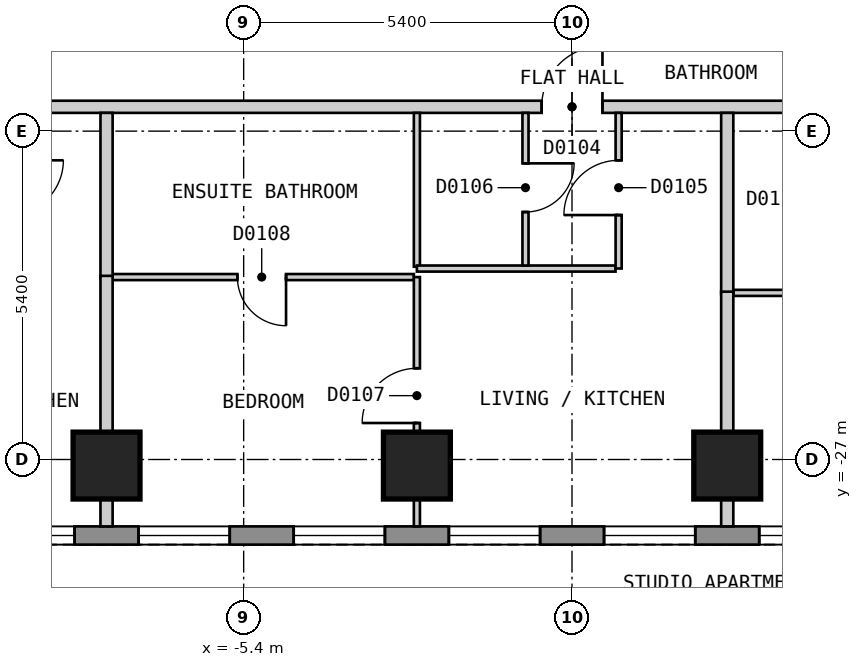
"""IFC4 building model, lengths in metres.
Left out: names, types, materials, properties, quantities, classifications, styles, units other than length and angle.
Written with IfcOpenShell. Run it as: python <this file> out.ifc"""

import sys

from ifc_helpers import new_model, si_unit, direction, frame, frame_2d, origin, origin_2d, place, context, subcontext, project, spatial, polyline, rectangle, outline, extrude, element, fill, save


model = new_model("IFC4")
c1 = context("Model", 3, precision=1e-05, world=origin(), true_north=direction((0.0, 1.0)))
c2 = subcontext(c1, "Body", "Model", "MODEL_VIEW")
j1 = project(units=[si_unit("LENGTHUNIT", "METRE"), si_unit("PLANEANGLEUNIT", "RADIAN")], contexts=[c1])
p1 = place(None, origin())
s1 = spatial("IfcSite", under=j1, at=p1, CompositionType="ELEMENT")
p2 = place(p1, origin())
s2 = spatial("IfcBuilding", under=s1, at=p2, CompositionType="ELEMENT")
p3 = place(p2, frame((0.0, 0.0, 23.4)))
s3 = spatial("IfcBuildingStorey", under=s2, at=p3, CompositionType="ELEMENT", Elevation=23.4)
for number, where, z_axis, x_axis in (
    (1, (-7.655, -27.1, 0.0), (0.0, 0.0, 1.0), (1.0, 0.0, 0.0)),
    (2, (-2.551, -27.1, 0.0), (0.0, 0.0, 1.0), (1.0, 0.0, 0.0)),
    (3, (2.553, -27.1, 0.0), (0.0, 0.0, 1.0), (1.0, 0.0, 0.0)),
):
    element("IfcColumn", number, at=place(p3, frame(where, z_axis=z_axis, x_axis=x_axis)), inside=s3, PredefinedType="COLUMN", context=c2, shape_type="SweptSolid", body=[
        extrude(rectangle(XDim=1.1, YDim=1.1, at=origin_2d()), origin(), (0.0, 0.0, 1.0), 3.0),
    ])
p4 = place(p3, frame((-13.51, -28.25, 0.0), z_axis=(0.0, 0.0, 1.0), x_axis=(1.0, 0.0, 0.0)))
e4 = element("IfcWall", 4, at=p4, inside=s3, PredefinedType="SOLIDWALL", context=c2, shape_type="SweptSolid", body=[
    extrude(outline(polyline([(0.0, -0.15), (27.02, -0.15), (26.94, 0.15), (0.08, 0.15), (0.0, -0.15)])), origin(), (0.0, 0.0, 1.0), 2.7),
])
p5 = place(p4, frame((1.277, 0.0, 0.15)))
e5 = element("IfcOpeningElement", 5, at=p5, cuts=e4, PredefinedType="OPENING", context=c2, shape_type="SweptSolid", body=[
    extrude(rectangle(XDim=1.5, YDim=2.1, at=frame_2d((0.75, 1.05))), frame((0.0, 0.16, 0.0), z_axis=(0.0, -1.0, 0.0), x_axis=(1.0, 0.0, 0.0)), (0.0, 0.0, 1.0), 0.32),
])
p6 = place(p4, frame((3.829, 0.0, 0.15)))
e6 = element("IfcOpeningElement", 6, at=p6, cuts=e4, PredefinedType="OPENING", context=c2, shape_type="SweptSolid", body=[
    extrude(rectangle(XDim=1.5, YDim=2.1, at=frame_2d((0.75, 1.05))), frame((0.0, 0.16, 0.0), z_axis=(0.0, -1.0, 0.0), x_axis=(1.0, 0.0, 0.0)), (0.0, 0.0, 1.0), 0.32),
])
p7 = place(p4, frame((6.381, 0.0, 0.15)))
e7 = element("IfcOpeningElement", 7, at=p7, cuts=e4, PredefinedType="OPENING", context=c2, shape_type="SweptSolid", body=[
    extrude(rectangle(XDim=1.5, YDim=2.1, at=frame_2d((0.75, 1.05))), frame((0.0, 0.16, 0.0), z_axis=(0.0, -1.0, 0.0), x_axis=(1.0, 0.0, 0.0)), (0.0, 0.0, 1.0), 0.32),
])
p8 = place(p4, frame((8.933, 0.0, 0.15)))
e8 = element("IfcOpeningElement", 8, at=p8, cuts=e4, PredefinedType="OPENING", context=c2, shape_type="SweptSolid", body=[
    extrude(rectangle(XDim=1.5, YDim=2.1, at=frame_2d((0.75, 1.05))), frame((0.0, 0.16, 0.0), z_axis=(0.0, -1.0, 0.0), x_axis=(1.0, 0.0, 0.0)), (0.0, 0.0, 1.0), 0.32),
])
p9 = place(p4, frame((11.485, 0.0, 0.15)))
e9 = element("IfcOpeningElement", 9, at=p9, cuts=e4, PredefinedType="OPENING", context=c2, shape_type="SweptSolid", body=[
    extrude(rectangle(XDim=1.5, YDim=2.1, at=frame_2d((0.75, 1.05))), frame((0.0, 0.16, 0.0), z_axis=(0.0, -1.0, 0.0), x_axis=(1.0, 0.0, 0.0)), (0.0, 0.0, 1.0), 0.32),
])
p10 = place(p4, frame((14.037, 0.0, 0.15)))
e10 = element("IfcOpeningElement", 10, at=p10, cuts=e4, PredefinedType="OPENING", context=c2, shape_type="SweptSolid", body=[
    extrude(rectangle(XDim=1.5, YDim=2.1, at=frame_2d((0.75, 1.05))), frame((0.0, 0.16, 0.0), z_axis=(0.0, -1.0, 0.0), x_axis=(1.0, 0.0, 0.0)), (0.0, 0.0, 1.0), 0.32),
])
p11 = place(p4, frame((16.589, 0.0, 0.15)))
e11 = element("IfcOpeningElement", 11, at=p11, cuts=e4, PredefinedType="OPENING", context=c2, shape_type="SweptSolid", body=[
    extrude(rectangle(XDim=1.5, YDim=2.1, at=frame_2d((0.75, 1.05))), frame((0.0, 0.16, 0.0), z_axis=(0.0, -1.0, 0.0), x_axis=(1.0, 0.0, 0.0)), (0.0, 0.0, 1.0), 0.32),
])
p12 = place(p4, frame((19.141, 0.0, 0.15)))
e12 = element("IfcOpeningElement", 12, at=p12, cuts=e4, PredefinedType="OPENING", context=c2, shape_type="SweptSolid", body=[
    extrude(rectangle(XDim=1.5, YDim=2.1, at=frame_2d((0.75, 1.05))), frame((0.0, 0.16, 0.0), z_axis=(0.0, -1.0, 0.0), x_axis=(1.0, 0.0, 0.0)), (0.0, 0.0, 1.0), 0.32),
])
p13 = place(p4, frame((21.693, 0.0, 0.15)))
e13 = element("IfcOpeningElement", 13, at=p13, cuts=e4, PredefinedType="OPENING", context=c2, shape_type="SweptSolid", body=[
    extrude(rectangle(XDim=1.5, YDim=2.1, at=frame_2d((0.75, 1.05))), frame((0.0, 0.16, 0.0), z_axis=(0.0, -1.0, 0.0), x_axis=(1.0, 0.0, 0.0)), (0.0, 0.0, 1.0), 0.32),
])
p14 = place(p4, frame((24.245, 0.0, 0.15)))
e14 = element("IfcOpeningElement", 14, at=p14, cuts=e4, PredefinedType="OPENING", context=c2, shape_type="SweptSolid", body=[
    extrude(rectangle(XDim=1.5, YDim=2.1, at=frame_2d((0.75, 1.05))), frame((0.0, 0.16, 0.0), z_axis=(0.0, -1.0, 0.0), x_axis=(1.0, 0.0, 0.0)), (0.0, 0.0, 1.0), 0.32),
])
p15 = place(p3, frame((-15.4, -21.2, 0.0), z_axis=(0.0, 0.0, 1.0), x_axis=(1.0, 0.0, 0.0)))
e15 = element("IfcWall", 15, at=p15, inside=s3, PredefinedType="PARTITIONING", context=c2, shape_type="SweptSolid", body=[
    extrude(rectangle(XDim=30.799, YDim=0.2, at=frame_2d((15.399, 0.0))), origin(), (0.0, 0.0, 1.0), 2.7),
])
p16 = place(p15, frame((4.985, 0.0, 0.0)))
e16 = element("IfcOpeningElement", 16, at=p16, cuts=e15, PredefinedType="OPENING", context=c2, shape_type="SweptSolid", body=[
    extrude(rectangle(XDim=0.9, YDim=2.1, at=frame_2d((0.45, 1.05))), frame((0.0, 0.11, 0.0), z_axis=(0.0, -1.0, 0.0), x_axis=(1.0, 0.0, 0.0)), (0.0, 0.0, 1.0), 0.22),
])
p17 = place(p15, frame((14.901, 0.0, 0.0)))
e17 = element("IfcOpeningElement", 17, at=p17, cuts=e15, PredefinedType="OPENING", context=c2, shape_type="SweptSolid", body=[
    extrude(rectangle(XDim=1.0, YDim=2.1, at=frame_2d((0.5, 1.05))), frame((0.0, 0.11, 0.0), z_axis=(0.0, -1.0, 0.0), x_axis=(1.0, 0.0, 0.0)), (0.0, 0.0, 1.0), 0.22),
])
p18 = place(p15, frame((20.005, 0.0, 0.0)))
e18 = element("IfcOpeningElement", 18, at=p18, cuts=e15, PredefinedType="OPENING", context=c2, shape_type="SweptSolid", body=[
    extrude(rectangle(XDim=1.0, YDim=2.1, at=frame_2d((0.5, 1.05))), frame((0.0, 0.11, 0.0), z_axis=(0.0, -1.0, 0.0), x_axis=(1.0, 0.0, 0.0)), (0.0, 0.0, 1.0), 0.22),
])
p19 = place(p15, frame((24.916, 0.0, 0.0)))
e19 = element("IfcOpeningElement", 19, at=p19, cuts=e15, PredefinedType="OPENING", context=c2, shape_type="SweptSolid", body=[
    extrude(rectangle(XDim=0.9, YDim=2.1, at=frame_2d((0.45, 1.05))), frame((0.0, 0.11, 0.0), z_axis=(0.0, -1.0, 0.0), x_axis=(1.0, 0.0, 0.0)), (0.0, 0.0, 1.0), 0.22),
])
p20 = place(p3, frame((-2.551, -21.3, 0.0), z_axis=(0.0, 0.0, 1.0), x_axis=(0.0, -1.0, 0.0)))
e20 = element("IfcWall", 20, at=p20, inside=s3, PredefinedType="PARTITIONING", context=c2, shape_type="SweptSolid", body=[
    extrude(rectangle(XDim=2.53, YDim=0.1, at=frame_2d((1.265, 0.0))), origin(), (0.0, 0.0, 1.0), 2.7),
])
p21 = place(p3, frame((-2.551, -23.86, 0.0), z_axis=(0.0, 0.0, 1.0), x_axis=(1.0, 0.0, 0.0)))
e21 = element("IfcWall", 21, at=p21, inside=s3, PredefinedType="PARTITIONING", context=c2, shape_type="SweptSolid", body=[
    extrude(rectangle(XDim=3.267, YDim=0.1, at=frame_2d((1.634, 0.0))), origin(), (0.0, 0.0, 1.0), 2.7),
])
p22 = place(p3, frame((-7.555, -24.0, 0.0), z_axis=(0.0, 0.0, 1.0), x_axis=(1.0, 0.0, 0.0)))
e22 = element("IfcWall", 22, at=p22, inside=s3, PredefinedType="PARTITIONING", context=c2, shape_type="SweptSolid", body=[
    extrude(rectangle(XDim=4.954, YDim=0.1, at=frame_2d((2.477, 0.0))), origin(), (0.0, 0.0, 1.0), 2.7),
])
p23 = place(p22, frame((2.052, 0.0, 0.0)))
e23 = element("IfcOpeningElement", 23, at=p23, cuts=e22, PredefinedType="OPENING", context=c2, shape_type="SweptSolid", body=[
    extrude(rectangle(XDim=0.8, YDim=2.1, at=frame_2d((0.4, 1.05))), frame((0.0, 0.06, 0.0), z_axis=(0.0, -1.0, 0.0), x_axis=(1.0, 0.0, 0.0)), (0.0, 0.0, 1.0), 0.12),
])
p24 = place(p3, frame((2.653, -24.26, 0.0), z_axis=(0.0, 0.0, 1.0), x_axis=(1.0, 0.0, 0.0)))
e24 = element("IfcWall", 24, at=p24, inside=s3, PredefinedType="PARTITIONING", context=c2, shape_type="SweptSolid", body=[
    extrude(rectangle(XDim=3.167, YDim=0.1, at=frame_2d((1.583, 0.0))), origin(), (0.0, 0.0, 1.0), 2.7),
])
p25 = place(p3, frame((0.767, -23.859, 0.0), z_axis=(0.0, 0.0, 1.0), x_axis=(0.0, 1.0, 0.0)))
e25 = element("IfcWall", 25, at=p25, inside=s3, PredefinedType="PARTITIONING", context=c2, shape_type="SweptSolid", body=[
    extrude(rectangle(XDim=2.559, YDim=0.1, at=frame_2d((1.279, 0.0))), origin(), (0.0, 0.0, 1.0), 2.7),
])
p26 = place(p25, frame((0.879, 0.0, 0.0)))
e26 = element("IfcOpeningElement", 26, at=p26, cuts=e25, PredefinedType="OPENING", context=c2, shape_type="SweptSolid", body=[
    extrude(rectangle(XDim=0.9, YDim=2.1, at=frame_2d((0.45, 1.05))), frame((0.0, 0.06, 0.0), z_axis=(0.0, -1.0, 0.0), x_axis=(1.0, 0.0, 0.0)), (0.0, 0.0, 1.0), 0.12),
])
p27 = place(p3, frame((-0.765, -23.81, 0.0), z_axis=(0.0, 0.0, 1.0), x_axis=(0.0, 1.0, 0.0)))
e27 = element("IfcWall", 27, at=p27, inside=s3, PredefinedType="PARTITIONING", context=c2, shape_type="SweptSolid", body=[
    extrude(rectangle(XDim=2.51, YDim=0.1, at=frame_2d((1.255, 0.0))), origin(), (0.0, 0.0, 1.0), 2.7),
])
p28 = place(p27, frame((0.88, 0.0, 0.0)))
e28 = element("IfcOpeningElement", 28, at=p28, cuts=e27, PredefinedType="OPENING", context=c2, shape_type="SweptSolid", body=[
    extrude(rectangle(XDim=0.8, YDim=2.1, at=frame_2d((0.4, 1.05))), frame((0.0, 0.06, 0.0), z_axis=(0.0, -1.0, 0.0), x_axis=(1.0, 0.0, 0.0)), (0.0, 0.0, 1.0), 0.12),
])
p29 = place(p3, frame((-2.551, -28.1, 0.0), z_axis=(0.0, 0.0, 1.0), x_axis=(0.0, 1.0, 0.0)))
e29 = element("IfcWall", 29, at=p29, inside=s3, PredefinedType="PARTITIONING", context=c2, shape_type="SweptSolid", body=[
    extrude(rectangle(XDim=4.1, YDim=0.1, at=frame_2d((2.05, 0.0))), origin(), (0.0, 0.0, 1.0), 2.7),
])
p30 = place(p29, frame((1.7, 0.0, 0.0)))
e30 = element("IfcOpeningElement", 30, at=p30, cuts=e29, PredefinedType="OPENING", context=c2, shape_type="SweptSolid", body=[
    extrude(rectangle(XDim=0.9, YDim=2.1, at=frame_2d((0.45, 1.05))), frame((0.0, 0.06, 0.0), z_axis=(0.0, -1.0, 0.0), x_axis=(1.0, 0.0, 0.0)), (0.0, 0.0, 1.0), 0.12),
])
p31 = place(p3, frame((-7.655, -21.3, 0.0), z_axis=(0.0, 0.0, 1.0), x_axis=(0.0, -1.0, 0.0)))
e31 = element("IfcWall", 31, at=p31, inside=s3, PredefinedType="PARTITIONING", context=c2, shape_type="SweptSolid", body=[
    extrude(rectangle(XDim=2.72, YDim=0.2, at=frame_2d((1.36, 0.0))), origin(), (0.0, 0.0, 1.0), 2.7),
])
p32 = place(p3, frame((2.553, -21.3, 0.0), z_axis=(0.0, 0.0, 1.0), x_axis=(0.0, -1.0, 0.0)))
e32 = element("IfcWall", 32, at=p32, inside=s3, PredefinedType="PARTITIONING", context=c2, shape_type="SweptSolid", body=[
    extrude(rectangle(XDim=2.98, YDim=0.2, at=frame_2d((1.49, 0.0))), origin(), (0.0, 0.0, 1.0), 2.7),
])
p33 = place(p3, frame((2.553, -28.1, 0.0), z_axis=(0.0, 0.0, 1.0), x_axis=(0.0, 1.0, 0.0)))
e33 = element("IfcWall", 33, at=p33, inside=s3, PredefinedType="PARTITIONING", context=c2, shape_type="SweptSolid", body=[
    extrude(rectangle(XDim=3.86, YDim=0.2, at=frame_2d((1.93, 0.0))), origin(), (0.0, 0.0, 1.0), 2.7),
])
p34 = place(p3, frame((-7.655, -28.1, 0.0), z_axis=(0.0, 0.0, 1.0), x_axis=(0.0, 1.0, 0.0)))
e34 = element("IfcWall", 34, at=p34, inside=s3, PredefinedType="PARTITIONING", context=c2, shape_type="SweptSolid", body=[
    extrude(rectangle(XDim=4.12, YDim=0.2, at=frame_2d((2.06, 0.0))), origin(), (0.0, 0.0, 1.0), 2.7),
])
p35 = place(p6, origin())
e35 = element("IfcWindow", 35, at=p35, inside=s3, PartitioningType="SINGLE_PANEL", PredefinedType="WINDOW", context=c2, shape_type="SweptSolid", body=[
    extrude(rectangle(XDim=1.5, YDim=2.1, at=frame_2d((0.75, 1.05))), frame((0.0, 0.03, 0.0), z_axis=(0.0, -1.0, 0.0), x_axis=(1.0, 0.0, 0.0)), (0.0, 0.0, 1.0), 0.06),
])
fill(e6, e35)
p36 = place(p7, origin())
e36 = element("IfcWindow", 36, at=p36, inside=s3, PartitioningType="SINGLE_PANEL", PredefinedType="WINDOW", context=c2, shape_type="SweptSolid", body=[
    extrude(rectangle(XDim=1.5, YDim=2.1, at=frame_2d((0.75, 1.05))), frame((0.0, 0.03, 0.0), z_axis=(0.0, -1.0, 0.0), x_axis=(1.0, 0.0, 0.0)), (0.0, 0.0, 1.0), 0.06),
])
fill(e7, e36)
p37 = place(p8, origin())
e37 = element("IfcWindow", 37, at=p37, inside=s3, PartitioningType="SINGLE_PANEL", PredefinedType="WINDOW", context=c2, shape_type="SweptSolid", body=[
    extrude(rectangle(XDim=1.5, YDim=2.1, at=frame_2d((0.75, 1.05))), frame((0.0, 0.03, 0.0), z_axis=(0.0, -1.0, 0.0), x_axis=(1.0, 0.0, 0.0)), (0.0, 0.0, 1.0), 0.06),
])
fill(e8, e37)
p38 = place(p9, origin())
e38 = element("IfcWindow", 38, at=p38, inside=s3, PartitioningType="SINGLE_PANEL", PredefinedType="WINDOW", context=c2, shape_type="SweptSolid", body=[
    extrude(rectangle(XDim=1.5, YDim=2.1, at=frame_2d((0.75, 1.05))), frame((0.0, 0.03, 0.0), z_axis=(0.0, -1.0, 0.0), x_axis=(1.0, 0.0, 0.0)), (0.0, 0.0, 1.0), 0.06),
])
fill(e9, e38)
p39 = place(p10, origin())
e39 = element("IfcWindow", 39, at=p39, inside=s3, PartitioningType="SINGLE_PANEL", PredefinedType="WINDOW", context=c2, shape_type="SweptSolid", body=[
    extrude(rectangle(XDim=1.5, YDim=2.1, at=frame_2d((0.75, 1.05))), frame((0.0, 0.03, 0.0), z_axis=(0.0, -1.0, 0.0), x_axis=(1.0, 0.0, 0.0)), (0.0, 0.0, 1.0), 0.06),
])
fill(e10, e39)
p40 = place(p11, origin())
e40 = element("IfcWindow", 40, at=p40, inside=s3, PartitioningType="SINGLE_PANEL", PredefinedType="WINDOW", context=c2, shape_type="SweptSolid", body=[
    extrude(rectangle(XDim=1.5, YDim=2.1, at=frame_2d((0.75, 1.05))), frame((0.0, 0.03, 0.0), z_axis=(0.0, -1.0, 0.0), x_axis=(1.0, 0.0, 0.0)), (0.0, 0.0, 1.0), 0.06),
])
fill(e11, e40)
p41 = place(p17, origin())
e41 = element("IfcDoor", 41, at=p41, inside=s3, OperationType="SINGLE_SWING_RIGHT", PredefinedType="DOOR", context=c2, shape_type="SweptSolid", body=[
    extrude(rectangle(XDim=1.0, YDim=2.1, at=frame_2d((0.5, 1.05))), frame((0.0, 0.025, 0.0), z_axis=(0.0, -1.0, 0.0), x_axis=(1.0, 0.0, 0.0)), (0.0, 0.0, 1.0), 0.05),
])
fill(e17, e41)
p42 = place(p26, origin())
e42 = element("IfcDoor", 42, at=p42, inside=s3, OperationType="SINGLE_SWING_LEFT", PredefinedType="DOOR", context=c2, shape_type="SweptSolid", body=[
    extrude(rectangle(XDim=0.9, YDim=2.1, at=frame_2d((0.45, 1.05))), frame((0.0, 0.025, 0.0), z_axis=(0.0, -1.0, 0.0), x_axis=(1.0, 0.0, 0.0)), (0.0, 0.0, 1.0), 0.05),
])
fill(e26, e42)
p43 = place(p28, origin())
e43 = element("IfcDoor", 43, at=p43, inside=s3, OperationType="SINGLE_SWING_RIGHT", PredefinedType="DOOR", context=c2, shape_type="SweptSolid", body=[
    extrude(rectangle(XDim=0.8, YDim=2.1, at=frame_2d((0.4, 1.05))), frame((0.0, 0.025, 0.0), z_axis=(0.0, -1.0, 0.0), x_axis=(1.0, 0.0, 0.0)), (0.0, 0.0, 1.0), 0.05),
])
fill(e28, e43)
p44 = place(p30, origin())
e44 = element("IfcDoor", 44, at=p44, inside=s3, OperationType="SINGLE_SWING_LEFT", PredefinedType="DOOR", context=c2, shape_type="SweptSolid", body=[
    extrude(rectangle(XDim=0.9, YDim=2.1, at=frame_2d((0.45, 1.05))), frame((0.0, 0.025, 0.0), z_axis=(0.0, -1.0, 0.0), x_axis=(1.0, 0.0, 0.0)), (0.0, 0.0, 1.0), 0.05),
])
fill(e30, e44)
p45 = place(p23, origin())
e45 = element("IfcDoor", 45, at=p45, inside=s3, OperationType="SINGLE_SWING_RIGHT", PredefinedType="DOOR", context=c2, shape_type="SweptSolid", body=[
    extrude(rectangle(XDim=0.8, YDim=2.1, at=frame_2d((0.4, 1.05))), frame((0.0, 0.025, 0.0), z_axis=(0.0, -1.0, 0.0), x_axis=(1.0, 0.0, 0.0)), (0.0, 0.0, 1.0), 0.05),
])
fill(e23, e45)
save(model, sys.argv[1])
